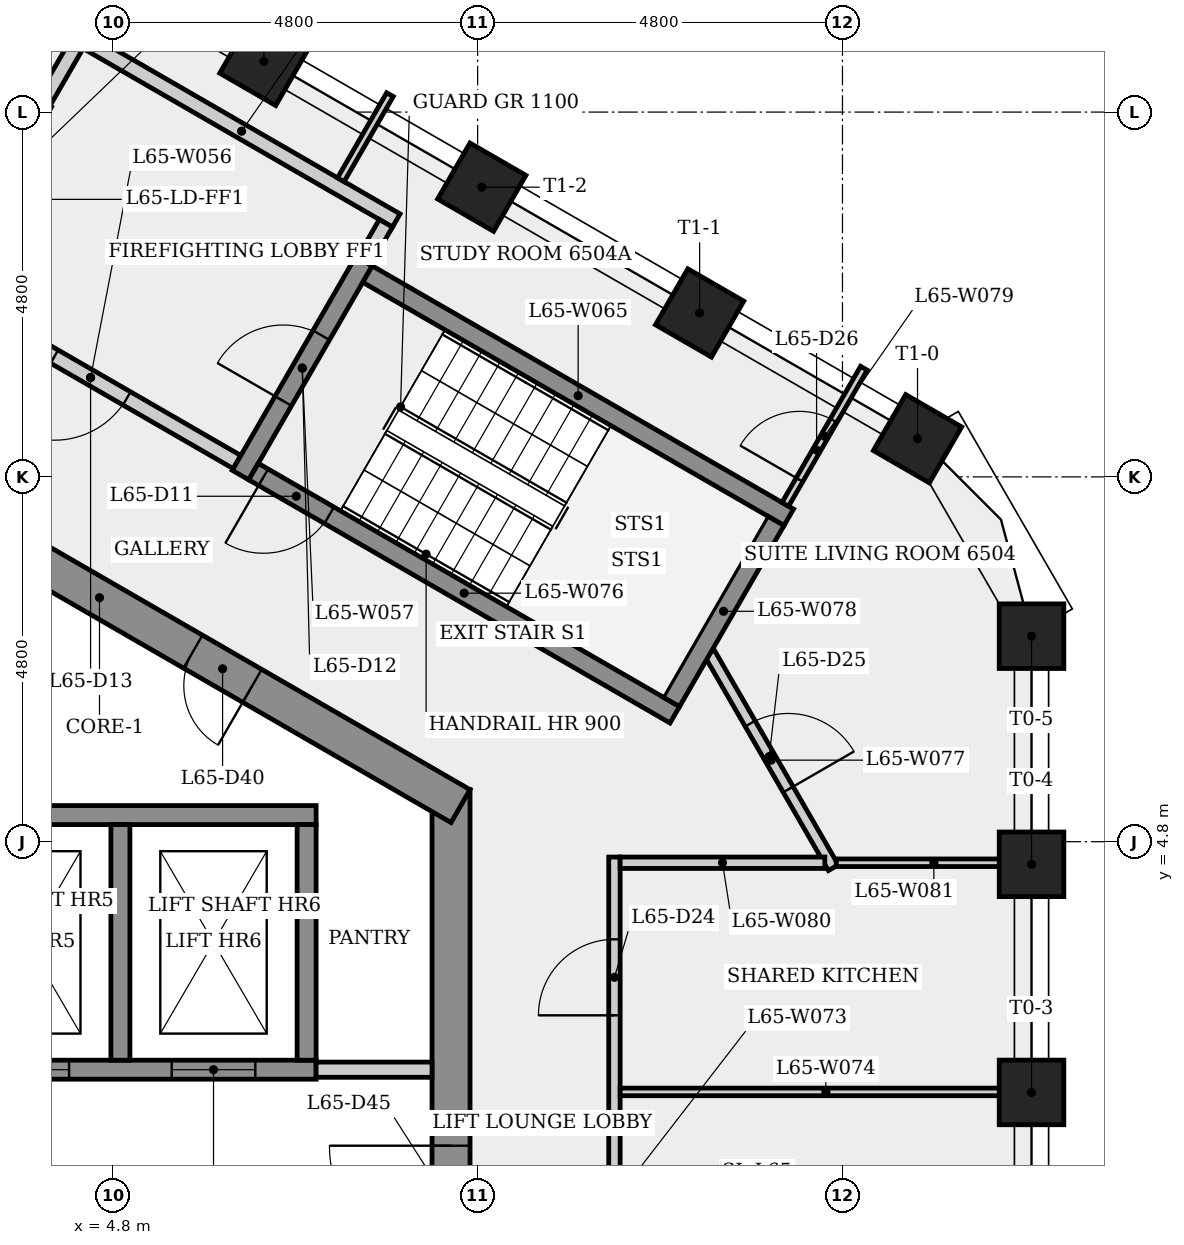
"""IFC4 building model, lengths in metres.
Left out: names, types, materials, properties, quantities, classifications, styles, units other than length and angle.
Written with IfcOpenShell. Run it as: python <this file> out.ifc"""

import sys

from ifc_helpers import new_model, si_unit, direction, frame, frame_2d, origin, origin_2d, place, context, subcontext, project, spatial, rectangle, extrude, element, fill, save


model = new_model("IFC4")
c1 = context("Model", 3, precision=1e-05, world=origin(), true_north=direction((0.0, 1.0)))
c2 = subcontext(c1, "Body", "Model", "MODEL_VIEW")
j1 = project(units=[si_unit("LENGTHUNIT", "METRE"), si_unit("PLANEANGLEUNIT", "RADIAN")], contexts=[c1])
p1 = place(None, origin())
s1 = spatial("IfcSite", under=j1, at=p1, CompositionType="ELEMENT")
p2 = place(p1, origin())
s2 = spatial("IfcBuilding", under=s1, at=p2, CompositionType="ELEMENT")
p3 = place(p2, frame((0.0, 0.0, 242.7)))
s3 = spatial("IfcBuildingStorey", under=s2, at=p3, CompositionType="ELEMENT", Elevation=242.7)
p4 = place(p3, frame((9.25, -5.485, 0.0), z_axis=(0.0, 0.0, 1.0), x_axis=(0.0, 1.0, 0.0)))
e1 = element("IfcWall", 1, at=p4, inside=s3, PredefinedType="SHEAR", context=c2, shape_type="SweptSolid", body=[
    extrude(rectangle(XDim=10.97, YDim=0.5, at=frame_2d((5.485, 0.0))), origin(), (0.0, 0.0, 1.0), 3.4),
])
p5 = place(p4, frame((4.685, 0.0, 0.0)))
e2 = element("IfcOpeningElement", 2, at=p5, cuts=e1, PredefinedType="OPENING", context=c2, shape_type="SweptSolid", body=[
    extrude(rectangle(XDim=1.6, YDim=2.1, at=frame_2d((0.8, 1.05))), frame((0.0, 0.26, 0.0), z_axis=(0.0, -1.0, 0.0), x_axis=(1.0, 0.0, 0.0)), (0.0, 0.0, 1.0), 0.52),
])
p6 = place(p3, frame((9.375, 5.268, 0.0), z_axis=(0.0, 0.0, 1.0), x_axis=(-0.866023993627, 0.500002442456, 0.0)))
e3 = element("IfcWall", 3, at=p6, inside=s3, PredefinedType="SHEAR", context=c2, shape_type="SweptSolid", body=[
    extrude(rectangle(XDim=10.97, YDim=0.5, at=frame_2d((5.485, 0.0))), origin(), (0.0, 0.0, 1.0), 3.4),
])
p7 = place(p6, frame((8.383, 0.0, 0.0)))
e4 = element("IfcOpeningElement", 4, at=p7, cuts=e3, PredefinedType="OPENING", context=c2, shape_type="SweptSolid", body=[
    extrude(rectangle(XDim=0.9, YDim=2.1, at=frame_2d((0.45, 1.05))), frame((0.0, 0.26, 0.0), z_axis=(0.0, -1.0, 0.0), x_axis=(1.0, 0.0, 0.0)), (0.0, 0.0, 1.0), 0.52),
])
p8 = place(p6, frame((3.165, 0.0, 0.0)))
e5 = element("IfcOpeningElement", 5, at=p8, cuts=e3, PredefinedType="OPENING", context=c2, shape_type="SweptSolid", body=[
    extrude(rectangle(XDim=0.9, YDim=2.1, at=frame_2d((0.45, 1.05))), frame((0.0, 0.26, 0.0), z_axis=(0.0, -1.0, 0.0), x_axis=(1.0, 0.0, 0.0)), (0.0, 0.0, 1.0), 0.52),
])
for number, where, z_axis, x_axis in (
    (6, (16.887, 1.501, 0.0), (0.0, 0.0, 1.0), (1.0, 0.0, 0.0)),
    (7, (16.887, 4.502, 0.0), (0.0, 0.0, 1.0), (1.0, 0.0, 0.0)),
    (8, (16.887, 7.504, 0.0), (0.0, 0.0, 1.0), (1.0, 0.0, 0.0)),
    (9, (15.387, 10.102, 0.0), (0.0, 0.0, 1.0), (0.5, 0.866, 0.0)),
    (10, (12.521, 11.757, 0.0), (0.0, 0.0, 1.0), (0.5, 0.866, 0.0)),
    (11, (9.655, 13.412, 0.0), (0.0, 0.0, 1.0), (0.5, 0.866, 0.0)),
    (12, (6.788, 15.067, 0.0), (0.0, 0.0, 1.0), (0.5, 0.866, 0.0)),
):
    element("IfcColumn", number, at=place(p3, frame(where, z_axis=z_axis, x_axis=x_axis)), inside=s3, PredefinedType="COLUMN", context=c2, shape_type="SweptSolid", body=[
        extrude(rectangle(XDim=0.85, YDim=0.85, at=origin_2d()), origin(), (0.0, 0.0, 1.0), 3.4),
    ])
p9 = place(p3, frame((-7.475, 1.8, 0.0), z_axis=(0.0, 0.0, 1.0), x_axis=(1.0, 0.0, 0.0)))
e13 = element("IfcWall", 13, at=p9, inside=s3, PredefinedType="SHEAR", context=c2, shape_type="SweptSolid", body=[
    extrude(rectangle(XDim=14.95, YDim=0.25, at=frame_2d((7.475, 0.0))), origin(), (0.0, 0.0, 1.0), 3.05),
])
p10 = place(p9, frame((0.8, 0.0, 0.0)))
e14 = element("IfcOpeningElement", 14, at=p10, cuts=e13, PredefinedType="OPENING", context=c2, shape_type="SweptSolid", body=[
    extrude(rectangle(XDim=1.1, YDim=2.1, at=frame_2d((0.55, 1.05))), frame((0.0, 0.135, 0.0), z_axis=(0.0, -1.0, 0.0), x_axis=(1.0, 0.0, 0.0)), (0.0, 0.0, 1.0), 0.27),
])
p11 = place(p9, frame((3.25, 0.0, 0.0)))
e15 = element("IfcOpeningElement", 15, at=p11, cuts=e13, PredefinedType="OPENING", context=c2, shape_type="SweptSolid", body=[
    extrude(rectangle(XDim=1.1, YDim=2.1, at=frame_2d((0.55, 1.05))), frame((0.0, 0.135, 0.0), z_axis=(0.0, -1.0, 0.0), x_axis=(1.0, 0.0, 0.0)), (0.0, 0.0, 1.0), 0.27),
])
p12 = place(p9, frame((5.7, 0.0, 0.0)))
e16 = element("IfcOpeningElement", 16, at=p12, cuts=e13, PredefinedType="OPENING", context=c2, shape_type="SweptSolid", body=[
    extrude(rectangle(XDim=1.1, YDim=2.1, at=frame_2d((0.55, 1.05))), frame((0.0, 0.135, 0.0), z_axis=(0.0, -1.0, 0.0), x_axis=(1.0, 0.0, 0.0)), (0.0, 0.0, 1.0), 0.27),
])
p13 = place(p9, frame((8.15, 0.0, 0.0)))
e17 = element("IfcOpeningElement", 17, at=p13, cuts=e13, PredefinedType="OPENING", context=c2, shape_type="SweptSolid", body=[
    extrude(rectangle(XDim=1.1, YDim=2.1, at=frame_2d((0.55, 1.05))), frame((0.0, 0.135, 0.0), z_axis=(0.0, -1.0, 0.0), x_axis=(1.0, 0.0, 0.0)), (0.0, 0.0, 1.0), 0.27),
])
p14 = place(p9, frame((10.6, 0.0, 0.0)))
e18 = element("IfcOpeningElement", 18, at=p14, cuts=e13, PredefinedType="OPENING", context=c2, shape_type="SweptSolid", body=[
    extrude(rectangle(XDim=1.1, YDim=2.1, at=frame_2d((0.55, 1.05))), frame((0.0, 0.135, 0.0), z_axis=(0.0, -1.0, 0.0), x_axis=(1.0, 0.0, 0.0)), (0.0, 0.0, 1.0), 0.27),
])
p15 = place(p9, frame((13.05, 0.0, 0.0)))
e19 = element("IfcOpeningElement", 19, at=p15, cuts=e13, PredefinedType="OPENING", context=c2, shape_type="SweptSolid", body=[
    extrude(rectangle(XDim=1.1, YDim=2.1, at=frame_2d((0.55, 1.05))), frame((0.0, 0.135, 0.0), z_axis=(0.0, -1.0, 0.0), x_axis=(1.0, 0.0, 0.0)), (0.0, 0.0, 1.0), 0.27),
])
p16 = place(p3, frame((-7.225, 5.15, 0.0), z_axis=(0.0, 0.0, 1.0), x_axis=(1.0, 0.0, 0.0)))
e20 = element("IfcWall", 20, at=p16, inside=s3, PredefinedType="SHEAR", context=c2, shape_type="SweptSolid", body=[
    extrude(rectangle(XDim=14.7, YDim=0.25, at=frame_2d((7.35, 0.0))), origin(), (0.0, 0.0, 1.0), 3.05),
])
p17 = place(p3, frame((3.885, 14.529, 0.0), z_axis=(0.0, 0.0, 1.0), x_axis=(0.499997628298, 0.866026773083, 0.0)))
e21 = element("IfcWall", 21, at=p17, inside=s3, PredefinedType="PARTITIONING", context=c2, shape_type="SweptSolid", body=[
    extrude(rectangle(XDim=1.075, YDim=0.2, at=frame_2d((0.538, 0.0))), origin(), (0.0, 0.0, 1.0), 3.05),
])
p18 = place(p3, frame((4.459, 15.323, 0.0), z_axis=(0.0, 0.0, 1.0), x_axis=(0.866016039709, -0.500016218704, 0.0)))
e22 = element("IfcWall", 22, at=p18, inside=s3, PredefinedType="PARTITIONING", context=c2, shape_type="SweptSolid", body=[
    extrude(rectangle(XDim=4.7, YDim=0.2, at=frame_2d((2.35, 0.0))), origin(), (0.0, 0.0, 1.0), 3.05),
])
p19 = place(p3, frame((4.9, 5.025, 0.0), z_axis=(0.0, 0.0, 1.0), x_axis=(0.0, -1.0, 0.0)))
e23 = element("IfcWall", 23, at=p19, inside=s3, PredefinedType="SHEAR", context=c2, shape_type="SweptSolid", body=[
    extrude(rectangle(XDim=3.1, YDim=0.25, at=frame_2d((1.55, 0.0))), origin(), (0.0, 0.0, 1.0), 3.4),
])
p20 = place(p3, frame((6.435, 9.795, 0.0), z_axis=(0.0, 0.0, 1.0), x_axis=(-0.866012907634, 0.500021643343, 0.0)))
e24 = element("IfcWall", 24, at=p20, inside=s3, PredefinedType="PARTITIONING", context=c2, shape_type="SweptSolid", body=[
    extrude(rectangle(XDim=4.45, YDim=0.2, at=frame_2d((2.225, 0.0))), origin(), (0.0, 0.0, 1.0), 3.05),
])
p21 = place(p20, frame((1.675, 0.0, 0.0)))
e25 = element("IfcOpeningElement", 25, at=p21, cuts=e24, PredefinedType="OPENING", context=c2, shape_type="SweptSolid", body=[
    extrude(rectangle(XDim=1.1, YDim=2.1, at=frame_2d((0.55, 1.05))), frame((0.0, 0.11, 0.0), z_axis=(0.0, -1.0, 0.0), x_axis=(1.0, 0.0, 0.0)), (0.0, 0.0, 1.0), 0.22),
])
p22 = place(p3, frame((6.48, 9.624, 0.0), z_axis=(0.0, 0.0, 1.0), x_axis=(0.500017246033, 0.866015446554, 0.0)))
e26 = element("IfcWall", 26, at=p22, inside=s3, PredefinedType="SHEAR", context=c2, shape_type="SweptSolid", body=[
    extrude(rectangle(XDim=3.25, YDim=0.25, at=frame_2d((1.625, 0.0))), origin(), (0.0, 0.0, 1.0), 3.05),
])
p23 = place(p22, frame((1.125, 0.0, 0.0)))
e27 = element("IfcOpeningElement", 27, at=p23, cuts=e26, PredefinedType="OPENING", context=c2, shape_type="SweptSolid", body=[
    extrude(rectangle(XDim=1.0, YDim=2.1, at=frame_2d((0.5, 1.05))), frame((0.0, 0.135, 0.0), z_axis=(0.0, -1.0, 0.0), x_axis=(1.0, 0.0, 0.0)), (0.0, 0.0, 1.0), 0.27),
])
p24 = place(p3, frame((7.475, 1.8, 0.0), z_axis=(0.0, 0.0, 1.0), x_axis=(1.0, 0.0, 0.0)))
e28 = element("IfcWall", 28, at=p24, inside=s3, PredefinedType="PARTITIONING", context=c2, shape_type="SweptSolid", body=[
    extrude(rectangle(XDim=1.525, YDim=0.2, at=frame_2d((0.763, 0.0))), origin(), (0.0, 0.0, 1.0), 3.05),
])
p25 = place(p3, frame((7.35, 5.025, 0.0), z_axis=(0.0, 0.0, 1.0), x_axis=(0.0, -1.0, 0.0)))
e29 = element("IfcWall", 29, at=p25, inside=s3, PredefinedType="SHEAR", context=c2, shape_type="SweptSolid", body=[
    extrude(rectangle(XDim=3.1, YDim=0.25, at=frame_2d((1.55, 0.0))), origin(), (0.0, 0.0, 1.0), 3.4),
])
p26 = place(p3, frame((7.8, 13.51, 0.0), z_axis=(0.0, 0.0, 1.0), x_axis=(0.499956713172, 0.866050394004, 0.0)))
e30 = element("IfcWall", 30, at=p26, inside=s3, PredefinedType="PARTITIONING", context=c2, shape_type="SweptSolid", body=[
    extrude(rectangle(XDim=1.293, YDim=0.1, at=frame_2d((0.646, 0.0))), origin(), (0.0, 0.0, 1.0), 3.05),
])
p27 = place(p3, frame((8.151, 12.268, 0.0), z_axis=(0.0, 0.0, 1.0), x_axis=(0.866025499775, -0.499999833739, 0.0)))
e31 = element("IfcWall", 31, at=p27, inside=s3, PredefinedType="SHEAR", context=c2, shape_type="SweptSolid", body=[
    extrude(rectangle(XDim=6.4, YDim=0.25, at=frame_2d((3.2, 0.0))), origin(), (0.0, 0.0, 1.0), 3.05),
])
p28 = place(p3, frame((8.393, 12.937, 0.0), z_axis=(0.0, 0.0, 1.0), x_axis=(-0.500065409566, -0.86598763626, 0.0)))
e32 = element("IfcWall", 32, at=p28, inside=s3, PredefinedType="PARTITIONING", context=c2, shape_type="SweptSolid", body=[
    extrude(rectangle(XDim=0.575, YDim=0.2, at=frame_2d((0.288, 0.0))), origin(), (0.0, 0.0, 1.0), 3.05),
])
p29 = place(p3, frame((11.4, -4.448, 0.0), z_axis=(0.0, 0.0, 1.0), x_axis=(0.0, 1.0, 0.0)))
e33 = element("IfcWall", 33, at=p29, inside=s3, PredefinedType="PARTITIONING", context=c2, shape_type="SweptSolid", body=[
    extrude(rectangle(XDim=9.046, YDim=0.15, at=frame_2d((4.523, 0.0))), origin(), (0.0, 0.0, 1.0), 3.05),
])
p30 = place(p29, frame((0.955, 0.0, 0.0)))
e34 = element("IfcOpeningElement", 34, at=p30, cuts=e33, PredefinedType="OPENING", context=c2, shape_type="SweptSolid", body=[
    extrude(rectangle(XDim=1.0, YDim=2.1, at=frame_2d((0.5, 1.05))), frame((0.0, 0.085, 0.0), z_axis=(0.0, -1.0, 0.0), x_axis=(1.0, 0.0, 0.0)), (0.0, 0.0, 1.0), 0.17),
])
p31 = place(p29, frame((3.948, 0.0, 0.0)))
e35 = element("IfcOpeningElement", 35, at=p31, cuts=e33, PredefinedType="OPENING", context=c2, shape_type="SweptSolid", body=[
    extrude(rectangle(XDim=1.0, YDim=2.1, at=frame_2d((0.5, 1.05))), frame((0.0, 0.085, 0.0), z_axis=(0.0, -1.0, 0.0), x_axis=(1.0, 0.0, 0.0)), (0.0, 0.0, 1.0), 0.17),
])
p32 = place(p29, frame((6.963, 0.0, 0.0)))
e36 = element("IfcOpeningElement", 36, at=p32, cuts=e33, PredefinedType="OPENING", context=c2, shape_type="SweptSolid", body=[
    extrude(rectangle(XDim=1.0, YDim=2.1, at=frame_2d((0.5, 1.05))), frame((0.0, 0.085, 0.0), z_axis=(0.0, -1.0, 0.0), x_axis=(1.0, 0.0, 0.0)), (0.0, 0.0, 1.0), 0.17),
])
p33 = place(p3, frame((11.475, 1.508, 0.0), z_axis=(0.0, 0.0, 1.0), x_axis=(1.0, 0.0, 0.0)))
e37 = element("IfcWall", 37, at=p33, inside=s3, PredefinedType="PARTITIONING", context=c2, shape_type="SweptSolid", body=[
    extrude(rectangle(XDim=5.412, YDim=0.1, at=frame_2d((2.706, 0.0))), origin(), (0.0, 0.0, 1.0), 3.05),
])
p34 = place(p3, frame((12.194, 6.47, 0.0), z_axis=(0.0, 0.0, 1.0), x_axis=(-0.866025499775, 0.499999833739, 0.0)))
e38 = element("IfcWall", 38, at=p34, inside=s3, PredefinedType="SHEAR", context=c2, shape_type="SweptSolid", body=[
    extrude(rectangle(XDim=6.4, YDim=0.25, at=frame_2d((3.2, 0.0))), origin(), (0.0, 0.0, 1.0), 3.05),
])
p35 = place(p34, frame((5.25, 0.0, 0.0)))
e39 = element("IfcOpeningElement", 39, at=p35, cuts=e38, PredefinedType="OPENING", context=c2, shape_type="SweptSolid", body=[
    extrude(rectangle(XDim=1.0, YDim=2.1, at=frame_2d((0.5, 1.05))), frame((0.0, 0.135, 0.0), z_axis=(0.0, -1.0, 0.0), x_axis=(1.0, 0.0, 0.0)), (0.0, 0.0, 1.0), 0.27),
])
p36 = place(p3, frame((12.646, 7.288, 0.0), z_axis=(0.0, 0.0, 1.0), x_axis=(0.499996247212, -0.866027570447, 0.0)))
e40 = element("IfcWall", 40, at=p36, inside=s3, PredefinedType="PARTITIONING", context=c2, shape_type="SweptSolid", body=[
    extrude(rectangle(XDim=3.268, YDim=0.15, at=frame_2d((1.634, 0.0))), origin(), (0.0, 0.0, 1.0), 3.05),
])
p37 = place(p36, frame((1.079, 0.0, 0.0)))
e41 = element("IfcOpeningElement", 41, at=p37, cuts=e40, PredefinedType="OPENING", context=c2, shape_type="SweptSolid", body=[
    extrude(rectangle(XDim=1.0, YDim=2.1, at=frame_2d((0.5, 1.05))), frame((0.0, 0.085, 0.0), z_axis=(0.0, -1.0, 0.0), x_axis=(1.0, 0.0, 0.0)), (0.0, 0.0, 1.0), 0.17),
])
p38 = place(p3, frame((12.148, 6.641, 0.0), z_axis=(0.0, 0.0, 1.0), x_axis=(0.500034990121, 0.866005201286, 0.0)))
e42 = element("IfcWall", 42, at=p38, inside=s3, PredefinedType="SHEAR", context=c2, shape_type="SweptSolid", body=[
    extrude(rectangle(XDim=2.75, YDim=0.25, at=frame_2d((1.375, 0.0))), origin(), (0.0, 0.0, 1.0), 3.05),
])
p39 = place(p3, frame((13.648, 9.239, 0.0), z_axis=(0.0, 0.0, 1.0), x_axis=(0.500049439734, 0.865996857859, 0.0)))
e43 = element("IfcWall", 43, at=p39, inside=s3, PredefinedType="PARTITIONING", context=c2, shape_type="SweptSolid", body=[
    extrude(rectangle(XDim=2.068, YDim=0.1, at=frame_2d((1.034, 0.0))), origin(), (0.0, 0.0, 1.0), 3.05),
])
p40 = place(p39, frame((0.374, 0.0, 0.0)))
e44 = element("IfcOpeningElement", 44, at=p40, cuts=e43, PredefinedType="OPENING", context=c2, shape_type="SweptSolid", body=[
    extrude(rectangle(XDim=0.9, YDim=2.1, at=frame_2d((0.45, 1.05))), frame((0.0, 0.06, 0.0), z_axis=(0.0, -1.0, 0.0), x_axis=(1.0, 0.0, 0.0)), (0.0, 0.0, 1.0), 0.12),
])
p41 = place(p3, frame((14.168, 4.523, 0.0), z_axis=(0.0, 0.0, 1.0), x_axis=(-1.0, 0.0, 0.0)))
e45 = element("IfcWall", 45, at=p41, inside=s3, PredefinedType="PARTITIONING", context=c2, shape_type="SweptSolid", body=[
    extrude(rectangle(XDim=2.693, YDim=0.15, at=frame_2d((1.346, 0.0))), origin(), (0.0, 0.0, 1.0), 3.05),
])
p42 = place(p3, frame((14.318, 4.523, 0.0), z_axis=(0.0, 0.0, 1.0), x_axis=(1.0, 0.0, 0.0)))
e46 = element("IfcWall", 46, at=p42, inside=s3, PredefinedType="PARTITIONING", context=c2, shape_type="SweptSolid", body=[
    extrude(rectangle(XDim=2.57, YDim=0.1, at=frame_2d((1.285, 0.0))), origin(), (0.0, 0.0, 1.0), 3.05),
])
p43 = place(p14, origin())
e47 = element("IfcDoor", 47, at=p43, inside=s3, OperationType="SLIDING_TO_LEFT", PredefinedType="DOOR", context=c2, shape_type="SweptSolid", body=[
    extrude(rectangle(XDim=1.1, YDim=2.1, at=frame_2d((0.55, 1.05))), frame((0.0, 0.025, 0.0), z_axis=(0.0, -1.0, 0.0), x_axis=(1.0, 0.0, 0.0)), (0.0, 0.0, 1.0), 0.05),
])
fill(e18, e47)
p44 = place(p15, origin())
e48 = element("IfcDoor", 48, at=p44, inside=s3, OperationType="SLIDING_TO_LEFT", PredefinedType="DOOR", context=c2, shape_type="SweptSolid", body=[
    extrude(rectangle(XDim=1.1, YDim=2.1, at=frame_2d((0.55, 1.05))), frame((0.0, 0.025, 0.0), z_axis=(0.0, -1.0, 0.0), x_axis=(1.0, 0.0, 0.0)), (0.0, 0.0, 1.0), 0.05),
])
fill(e19, e48)
p45 = place(p35, origin())
e49 = element("IfcDoor", 49, at=p45, inside=s3, OperationType="SINGLE_SWING_RIGHT", PredefinedType="DOOR", context=c2, shape_type="SweptSolid", body=[
    extrude(rectangle(XDim=1.0, YDim=2.1, at=frame_2d((0.5, 1.05))), frame((0.0, 0.025, 0.0), z_axis=(0.0, -1.0, 0.0), x_axis=(1.0, 0.0, 0.0)), (0.0, 0.0, 1.0), 0.05),
])
fill(e39, e49)
p46 = place(p23, origin())
e50 = element("IfcDoor", 50, at=p46, inside=s3, OperationType="SINGLE_SWING_LEFT", PredefinedType="DOOR", context=c2, shape_type="SweptSolid", body=[
    extrude(rectangle(XDim=1.0, YDim=2.1, at=frame_2d((0.5, 1.05))), frame((0.0, 0.025, 0.0), z_axis=(0.0, -1.0, 0.0), x_axis=(1.0, 0.0, 0.0)), (0.0, 0.0, 1.0), 0.05),
])
fill(e27, e50)
p47 = place(p21, origin())
e51 = element("IfcDoor", 51, at=p47, inside=s3, OperationType="SINGLE_SWING_RIGHT", PredefinedType="DOOR", context=c2, shape_type="SweptSolid", body=[
    extrude(rectangle(XDim=1.1, YDim=2.1, at=frame_2d((0.55, 1.05))), frame((0.0, 0.025, 0.0), z_axis=(0.0, -1.0, 0.0), x_axis=(1.0, 0.0, 0.0)), (0.0, 0.0, 1.0), 0.05),
])
fill(e25, e51)
p48 = place(p32, origin())
e52 = element("IfcDoor", 52, at=p48, inside=s3, OperationType="SINGLE_SWING_LEFT", PredefinedType="DOOR", context=c2, shape_type="SweptSolid", body=[
    extrude(rectangle(XDim=1.0, YDim=2.1, at=frame_2d((0.5, 1.05))), frame((0.0, 0.025, 0.0), z_axis=(0.0, -1.0, 0.0), x_axis=(1.0, 0.0, 0.0)), (0.0, 0.0, 1.0), 0.05),
])
fill(e36, e52)
p49 = place(p37, origin())
e53 = element("IfcDoor", 53, at=p49, inside=s3, OperationType="SINGLE_SWING_RIGHT", PredefinedType="DOOR", context=c2, shape_type="SweptSolid", body=[
    extrude(rectangle(XDim=1.0, YDim=2.1, at=frame_2d((0.5, 1.05))), frame((0.0, 0.025, 0.0), z_axis=(0.0, -1.0, 0.0), x_axis=(1.0, 0.0, 0.0)), (0.0, 0.0, 1.0), 0.05),
])
fill(e41, e53)
p50 = place(p40, origin())
e54 = element("IfcDoor", 54, at=p50, inside=s3, OperationType="SINGLE_SWING_LEFT", PredefinedType="DOOR", context=c2, shape_type="SweptSolid", body=[
    extrude(rectangle(XDim=0.9, YDim=2.1, at=frame_2d((0.45, 1.05))), frame((0.0, 0.025, 0.0), z_axis=(0.0, -1.0, 0.0), x_axis=(1.0, 0.0, 0.0)), (0.0, 0.0, 1.0), 0.05),
])
fill(e44, e54)
p51 = place(p8, origin())
e55 = element("IfcDoor", 55, at=p51, inside=s3, OperationType="SINGLE_SWING_LEFT", PredefinedType="DOOR", context=c2, shape_type="SweptSolid", body=[
    extrude(rectangle(XDim=0.9, YDim=2.1, at=frame_2d((0.45, 1.05))), frame((0.0, 0.025, 0.0), z_axis=(0.0, -1.0, 0.0), x_axis=(1.0, 0.0, 0.0)), (0.0, 0.0, 1.0), 0.05),
])
fill(e5, e55)
p52 = place(p5, origin())
e56 = element("IfcDoor", 56, at=p52, inside=s3, OperationType="SINGLE_SWING_RIGHT", PredefinedType="DOOR", context=c2, shape_type="SweptSolid", body=[
    extrude(rectangle(XDim=1.6, YDim=2.1, at=frame_2d((0.8, 1.05))), frame((0.0, 0.025, 0.0), z_axis=(0.0, -1.0, 0.0), x_axis=(1.0, 0.0, 0.0)), (0.0, 0.0, 1.0), 0.05),
])
fill(e2, e56)
save(model, sys.argv[1])
